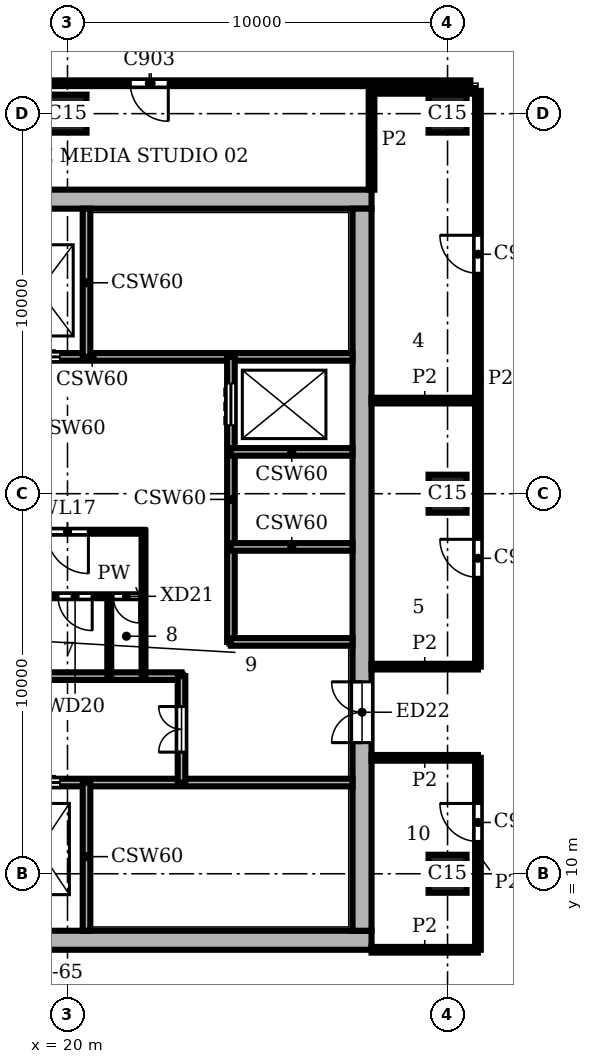
"""IFC4 building model, lengths in metres.
Left out: names, types, materials, properties, quantities, classifications, styles, units other than length and angle.
Written with IfcOpenShell. Run it as: python <this file> out.ifc"""

import sys

from ifc_helpers import new_model, si_unit, direction, frame, frame_2d, origin, origin_2d, place, context, subcontext, project, spatial, rectangle, extrude, element, fill, save


model = new_model("IFC4")
c1 = context("Model", 3, precision=1e-05, world=origin(), true_north=direction((0.0, 1.0)))
c2 = subcontext(c1, "Body", "Model", "MODEL_VIEW")
j1 = project(units=[si_unit("LENGTHUNIT", "METRE"), si_unit("PLANEANGLEUNIT", "RADIAN")], contexts=[c1])
p1 = place(None, origin())
s1 = spatial("IfcSite", under=j1, at=p1, CompositionType="ELEMENT")
p2 = place(p1, origin())
s2 = spatial("IfcBuilding", under=s1, at=p2, CompositionType="ELEMENT")
p3 = place(p2, frame((0.0, 0.0, 333.3)))
s3 = spatial("IfcBuildingStorey", under=s2, at=p3, CompositionType="ELEMENT", Elevation=333.3)
for number, where, z_axis, x_axis in (
    (1, (20.0, 30.0, 0.0), (0.0, 0.0, 1.0), (1.0, 0.0, 0.0)),
    (2, (30.0, 10.0, 0.0), (0.0, 0.0, 1.0), (1.0, 0.0, 0.0)),
    (3, (30.0, 20.0, 0.0), (0.0, 0.0, 1.0), (1.0, 0.0, 0.0)),
    (4, (30.0, 30.0, 0.0), (0.0, 0.0, 1.0), (1.0, 0.0, 0.0)),
):
    element("IfcColumn", number, at=place(p3, frame(where, z_axis=z_axis, x_axis=x_axis)), inside=s3, PredefinedType="COLUMN", context=c2, shape_type="SweptSolid", body=[
        extrude(rectangle(XDim=1.0, YDim=1.0, at=origin_2d()), origin(), (0.0, 0.0, 1.0), 3.9),
    ])
p4 = place(p3, frame((8.0, 8.25, 0.0), z_axis=(0.0, 0.0, 1.0), x_axis=(1.0, 0.0, 0.0)))
e5 = element("IfcWall", 5, at=p4, inside=s3, PredefinedType="SHEAR", context=c2, shape_type="SweptSolid", body=[
    extrude(rectangle(XDim=20.0, YDim=0.5, at=frame_2d((10.0, 0.0))), origin(), (0.0, 0.0, 1.0), 3.9),
])
p5 = place(p3, frame((27.75, 8.5, 0.0), z_axis=(0.0, 0.0, 1.0), x_axis=(0.0, 1.0, 0.0)))
e6 = element("IfcWall", 6, at=p5, inside=s3, PredefinedType="SHEAR", context=c2, shape_type="SweptSolid", body=[
    extrude(rectangle(XDim=19.0, YDim=0.5, at=frame_2d((9.5, 0.0))), origin(), (0.0, 0.0, 1.0), 3.9),
])
p6 = place(p5, frame((4.95, 0.0, 0.0)))
e7 = element("IfcOpeningElement", 7, at=p6, cuts=e6, PredefinedType="OPENING", context=c2, shape_type="SweptSolid", body=[
    extrude(rectangle(XDim=1.6, YDim=2.1, at=frame_2d((0.8, 1.05))), frame((0.0, 0.26, 0.0), z_axis=(0.0, -1.0, 0.0), x_axis=(1.0, 0.0, 0.0)), (0.0, 0.0, 1.0), 0.52),
])
p7 = place(p3, frame((28.0, 27.75, 0.0), z_axis=(0.0, 0.0, 1.0), x_axis=(-1.0, 0.0, 0.0)))
e8 = element("IfcWall", 8, at=p7, inside=s3, PredefinedType="SHEAR", context=c2, shape_type="SweptSolid", body=[
    extrude(rectangle(XDim=20.0, YDim=0.5, at=frame_2d((10.0, 0.0))), origin(), (0.0, 0.0, 1.0), 3.9),
])
p8 = place(p3, frame((13.8, 12.4, 0.0), z_axis=(0.0, 0.0, 1.0), x_axis=(1.0, 0.0, 0.0)))
e9 = element("IfcWall", 9, at=p8, inside=s3, PredefinedType="SHEAR", context=c2, shape_type="SweptSolid", body=[
    extrude(rectangle(XDim=13.7, YDim=0.2, at=frame_2d((6.85, 0.0))), origin(), (0.0, 0.0, 1.0), 3.58),
])
p9 = place(p8, frame((2.4, 0.0, 0.0)))
e10 = element("IfcOpeningElement", 10, at=p9, cuts=e9, PredefinedType="OPENING", context=c2, shape_type="SweptSolid", body=[
    extrude(rectangle(XDim=1.1, YDim=2.1, at=frame_2d((0.55, 1.05))), frame((0.0, 0.11, 0.0), z_axis=(0.0, -1.0, 0.0), x_axis=(1.0, 0.0, 0.0)), (0.0, 0.0, 1.0), 0.22),
])
p10 = place(p8, frame((4.9, 0.0, 0.0)))
e11 = element("IfcOpeningElement", 11, at=p10, cuts=e9, PredefinedType="OPENING", context=c2, shape_type="SweptSolid", body=[
    extrude(rectangle(XDim=1.1, YDim=2.1, at=frame_2d((0.55, 1.05))), frame((0.0, 0.11, 0.0), z_axis=(0.0, -1.0, 0.0), x_axis=(1.0, 0.0, 0.0)), (0.0, 0.0, 1.0), 0.22),
])
p11 = place(p8, frame((0.15, 0.0, 0.0)))
e12 = element("IfcOpeningElement", 12, at=p11, cuts=e9, PredefinedType="OPENING", context=c2, shape_type="SweptSolid", body=[
    extrude(rectangle(XDim=1.0, YDim=2.1, at=frame_2d((0.5, 1.05))), frame((0.0, 0.11, 0.0), z_axis=(0.0, -1.0, 0.0), x_axis=(1.0, 0.0, 0.0)), (0.0, 0.0, 1.0), 0.22),
])
p12 = place(p3, frame((13.3, 15.2, 0.0), z_axis=(0.0, 0.0, 1.0), x_axis=(1.0, 0.0, 0.0)))
e13 = element("IfcWall", 13, at=p12, inside=s3, PredefinedType="SHEAR", context=c2, shape_type="SweptSolid", body=[
    extrude(rectangle(XDim=9.7, YDim=0.2, at=frame_2d((4.85, 0.0))), origin(), (0.0, 0.0, 1.0), 3.58),
])
p13 = place(p3, frame((24.3, 16.1, 0.0), z_axis=(0.0, 0.0, 1.0), x_axis=(1.0, 0.0, 0.0)))
e14 = element("IfcWall", 14, at=p13, inside=s3, PredefinedType="SHEAR", context=c2, shape_type="SweptSolid", body=[
    extrude(rectangle(XDim=3.2, YDim=0.2, at=frame_2d((1.6, 0.0))), origin(), (0.0, 0.0, 1.0), 3.58),
])
p14 = place(p3, frame((14.0, 17.3, 0.0), z_axis=(0.0, 0.0, 1.0), x_axis=(1.0, 0.0, 0.0)))
e15 = element("IfcWall", 15, at=p14, inside=s3, PredefinedType="PARTITIONING", context=c2, shape_type="SweptSolid", body=[
    extrude(rectangle(XDim=8.0, YDim=0.1, at=frame_2d((4.0, 0.0))), origin(), (0.0, 0.0, 1.0), 3.58),
])
p15 = place(p14, frame((1.0, 0.0, 0.0)))
e16 = element("IfcOpeningElement", 16, at=p15, cuts=e15, PredefinedType="OPENING", context=c2, shape_type="SweptSolid", body=[
    extrude(rectangle(XDim=0.9, YDim=2.1, at=frame_2d((0.45, 1.05))), frame((0.0, 0.06, 0.0), z_axis=(0.0, -1.0, 0.0), x_axis=(1.0, 0.0, 0.0)), (0.0, 0.0, 1.0), 0.12),
])
p16 = place(p14, frame((3.65, 0.0, 0.0)))
e17 = element("IfcOpeningElement", 17, at=p16, cuts=e15, PredefinedType="OPENING", context=c2, shape_type="SweptSolid", body=[
    extrude(rectangle(XDim=0.9, YDim=2.1, at=frame_2d((0.45, 1.05))), frame((0.0, 0.06, 0.0), z_axis=(0.0, -1.0, 0.0), x_axis=(1.0, 0.0, 0.0)), (0.0, 0.0, 1.0), 0.12),
])
p17 = place(p14, frame((5.75, 0.0, 0.0)))
e18 = element("IfcOpeningElement", 18, at=p17, cuts=e15, PredefinedType="OPENING", context=c2, shape_type="SweptSolid", body=[
    extrude(rectangle(XDim=0.9, YDim=2.1, at=frame_2d((0.45, 1.05))), frame((0.0, 0.06, 0.0), z_axis=(0.0, -1.0, 0.0), x_axis=(1.0, 0.0, 0.0)), (0.0, 0.0, 1.0), 0.12),
])
p18 = place(p14, frame((7.2, 0.0, 0.0)))
e19 = element("IfcOpeningElement", 19, at=p18, cuts=e15, PredefinedType="OPENING", context=c2, shape_type="SweptSolid", body=[
    extrude(rectangle(XDim=0.7, YDim=2.1, at=frame_2d((0.35, 1.05))), frame((0.0, 0.06, 0.0), z_axis=(0.0, -1.0, 0.0), x_axis=(1.0, 0.0, 0.0)), (0.0, 0.0, 1.0), 0.12),
])
p19 = place(p3, frame((24.3, 18.6, 0.0), z_axis=(0.0, 0.0, 1.0), x_axis=(1.0, 0.0, 0.0)))
e20 = element("IfcWall", 20, at=p19, inside=s3, PredefinedType="SHEAR", context=c2, shape_type="SweptSolid", body=[
    extrude(rectangle(XDim=3.2, YDim=0.2, at=frame_2d((1.6, 0.0))), origin(), (0.0, 0.0, 1.0), 3.58),
])
p20 = place(p3, frame((14.0, 19.0, 0.0), z_axis=(0.0, 0.0, 1.0), x_axis=(1.0, 0.0, 0.0)))
e21 = element("IfcWall", 21, at=p20, inside=s3, PredefinedType="PARTITIONING", context=c2, shape_type="SweptSolid", body=[
    extrude(rectangle(XDim=8.0, YDim=0.1, at=frame_2d((4.0, 0.0))), origin(), (0.0, 0.0, 1.0), 3.58),
])
p21 = place(p20, frame((5.45, 0.0, 0.0)))
e22 = element("IfcOpeningElement", 22, at=p21, cuts=e21, PredefinedType="OPENING", context=c2, shape_type="SweptSolid", body=[
    extrude(rectangle(XDim=1.1, YDim=2.1, at=frame_2d((0.55, 1.05))), frame((0.0, 0.06, 0.0), z_axis=(0.0, -1.0, 0.0), x_axis=(1.0, 0.0, 0.0)), (0.0, 0.0, 1.0), 0.12),
])
p22 = place(p3, frame((24.3, 21.1, 0.0), z_axis=(0.0, 0.0, 1.0), x_axis=(1.0, 0.0, 0.0)))
e23 = element("IfcWall", 23, at=p22, inside=s3, PredefinedType="SHEAR", context=c2, shape_type="SweptSolid", body=[
    extrude(rectangle(XDim=3.2, YDim=0.2, at=frame_2d((1.6, 0.0))), origin(), (0.0, 0.0, 1.0), 3.58),
])
p23 = place(p3, frame((13.8, 23.6, 0.0), z_axis=(0.0, 0.0, 1.0), x_axis=(1.0, 0.0, 0.0)))
e24 = element("IfcWall", 24, at=p23, inside=s3, PredefinedType="SHEAR", context=c2, shape_type="SweptSolid", body=[
    extrude(rectangle(XDim=13.7, YDim=0.2, at=frame_2d((6.85, 0.0))), origin(), (0.0, 0.0, 1.0), 3.58),
])
p24 = place(p23, frame((2.4, 0.0, 0.0)))
e25 = element("IfcOpeningElement", 25, at=p24, cuts=e24, PredefinedType="OPENING", context=c2, shape_type="SweptSolid", body=[
    extrude(rectangle(XDim=1.1, YDim=2.1, at=frame_2d((0.55, 1.05))), frame((0.0, 0.11, 0.0), z_axis=(0.0, -1.0, 0.0), x_axis=(1.0, 0.0, 0.0)), (0.0, 0.0, 1.0), 0.22),
])
p25 = place(p23, frame((4.9, 0.0, 0.0)))
e26 = element("IfcOpeningElement", 26, at=p25, cuts=e24, PredefinedType="OPENING", context=c2, shape_type="SweptSolid", body=[
    extrude(rectangle(XDim=1.1, YDim=2.1, at=frame_2d((0.55, 1.05))), frame((0.0, 0.11, 0.0), z_axis=(0.0, -1.0, 0.0), x_axis=(1.0, 0.0, 0.0)), (0.0, 0.0, 1.0), 0.22),
])
p26 = place(p23, frame((0.15, 0.0, 0.0)))
e27 = element("IfcOpeningElement", 27, at=p26, cuts=e24, PredefinedType="OPENING", context=c2, shape_type="SweptSolid", body=[
    extrude(rectangle(XDim=1.0, YDim=2.1, at=frame_2d((0.5, 1.05))), frame((0.0, 0.11, 0.0), z_axis=(0.0, -1.0, 0.0), x_axis=(1.0, 0.0, 0.0)), (0.0, 0.0, 1.0), 0.22),
])
for number, where, z_axis, x_axis in (
    (28, (20.5, 8.5, 0.0), (0.0, 0.0, 1.0), (0.0, 1.0, 0.0)),
    (29, (20.5, 23.6, 0.0), (0.0, 0.0, 1.0), (0.0, 1.0, 0.0)),
):
    element("IfcWall", number, at=place(p3, frame(where, z_axis=z_axis, x_axis=x_axis)), inside=s3, PredefinedType="SHEAR", context=c2, shape_type="SweptSolid", body=[
        extrude(rectangle(XDim=3.9, YDim=0.2, at=frame_2d((1.95, 0.0))), origin(), (0.0, 0.0, 1.0), 3.58),
    ])
p27 = place(p3, frame((21.1, 15.2, 0.0), z_axis=(0.0, 0.0, 1.0), x_axis=(0.0, 1.0, 0.0)))
e30 = element("IfcWall", 30, at=p27, inside=s3, PredefinedType="PARTITIONING", context=c2, shape_type="SweptSolid", body=[
    extrude(rectangle(XDim=2.1, YDim=0.1, at=frame_2d((1.05, 0.0))), origin(), (0.0, 0.0, 1.0), 3.58),
])
p28 = place(p3, frame((22.0, 15.2, 0.0), z_axis=(0.0, 0.0, 1.0), x_axis=(0.0, 1.0, 0.0)))
e31 = element("IfcWall", 31, at=p28, inside=s3, PredefinedType="PARTITIONING", context=c2, shape_type="SweptSolid", body=[
    extrude(rectangle(XDim=3.8, YDim=0.1, at=frame_2d((1.9, 0.0))), origin(), (0.0, 0.0, 1.0), 3.58),
])
p29 = place(p3, frame((23.0, 12.4, 0.0), z_axis=(0.0, 0.0, 1.0), x_axis=(0.0, 1.0, 0.0)))
e32 = element("IfcWall", 32, at=p29, inside=s3, PredefinedType="SHEAR", context=c2, shape_type="SweptSolid", body=[
    extrude(rectangle(XDim=2.8, YDim=0.2, at=frame_2d((1.4, 0.0))), origin(), (0.0, 0.0, 1.0), 3.58),
])
p30 = place(p29, frame((0.8, 0.0, 0.0)))
e33 = element("IfcOpeningElement", 33, at=p30, cuts=e32, PredefinedType="OPENING", context=c2, shape_type="SweptSolid", body=[
    extrude(rectangle(XDim=1.2, YDim=2.1, at=frame_2d((0.6, 1.05))), frame((0.0, 0.11, 0.0), z_axis=(0.0, -1.0, 0.0), x_axis=(1.0, 0.0, 0.0)), (0.0, 0.0, 1.0), 0.22),
])
p31 = place(p3, frame((24.3, 16.1, 0.0), z_axis=(0.0, 0.0, 1.0), x_axis=(0.0, 1.0, 0.0)))
e34 = element("IfcWall", 34, at=p31, inside=s3, PredefinedType="SHEAR", context=c2, shape_type="SweptSolid", body=[
    extrude(rectangle(XDim=7.5, YDim=0.2, at=frame_2d((3.75, 0.0))), origin(), (0.0, 0.0, 1.0), 3.58),
])
p32 = place(p31, frame((5.7, 0.0, 0.0)))
e35 = element("IfcOpeningElement", 35, at=p32, cuts=e34, PredefinedType="OPENING", context=c2, shape_type="SweptSolid", body=[
    extrude(rectangle(XDim=1.1, YDim=2.1, at=frame_2d((0.55, 1.05))), frame((0.0, 0.11, 0.0), z_axis=(0.0, -1.0, 0.0), x_axis=(1.0, 0.0, 0.0)), (0.0, 0.0, 1.0), 0.22),
])
p33 = place(p3, frame((28.0, 28.0, 0.0), z_axis=(0.0, 0.0, 1.0), x_axis=(0.0, 1.0, 0.0)))
e36 = element("IfcWall", 36, at=p33, inside=s3, PredefinedType="PARTITIONING", context=c2, shape_type="SweptSolid", body=[
    extrude(rectangle(XDim=2.598, YDim=0.15, at=frame_2d((1.299, 0.0))), origin(), (0.0, 0.0, 1.0), 3.58),
])
p34 = place(p3, frame((30.8, 8.0, 0.0), z_axis=(0.0, 0.0, 1.0), x_axis=(0.0, 1.0, 0.0)))
e37 = element("IfcWall", 37, at=p34, inside=s3, PredefinedType="PARTITIONING", context=c2, shape_type="SweptSolid", body=[
    extrude(rectangle(XDim=5.05, YDim=0.15, at=frame_2d((2.525, 0.0))), origin(), (0.0, 0.0, 1.0), 3.58),
])
p35 = place(p34, frame((2.85, 0.0, 0.0)))
e38 = element("IfcOpeningElement", 38, at=p35, cuts=e37, PredefinedType="OPENING", context=c2, shape_type="SweptSolid", body=[
    extrude(rectangle(XDim=1.0, YDim=2.1, at=frame_2d((0.5, 1.05))), frame((0.0, 0.085, 0.0), z_axis=(0.0, -1.0, 0.0), x_axis=(1.0, 0.0, 0.0)), (0.0, 0.0, 1.0), 0.17),
])
p36 = place(p3, frame((30.8, 15.45, 0.0), z_axis=(0.0, 0.0, 1.0), x_axis=(0.0, 1.0, 0.0)))
e39 = element("IfcWall", 39, at=p36, inside=s3, PredefinedType="PARTITIONING", context=c2, shape_type="SweptSolid", body=[
    extrude(rectangle(XDim=15.15, YDim=0.15, at=frame_2d((7.575, 0.0))), origin(), (0.0, 0.0, 1.0), 3.58),
])
p37 = place(p36, frame((2.35, 0.0, 0.0)))
e40 = element("IfcOpeningElement", 40, at=p37, cuts=e39, PredefinedType="OPENING", context=c2, shape_type="SweptSolid", body=[
    extrude(rectangle(XDim=1.0, YDim=2.1, at=frame_2d((0.5, 1.05))), frame((0.0, 0.085, 0.0), z_axis=(0.0, -1.0, 0.0), x_axis=(1.0, 0.0, 0.0)), (0.0, 0.0, 1.0), 0.17),
])
p38 = place(p36, frame((10.35, 0.0, 0.0)))
e41 = element("IfcOpeningElement", 41, at=p38, cuts=e39, PredefinedType="OPENING", context=c2, shape_type="SweptSolid", body=[
    extrude(rectangle(XDim=1.0, YDim=2.1, at=frame_2d((0.5, 1.05))), frame((0.0, 0.085, 0.0), z_axis=(0.0, -1.0, 0.0), x_axis=(1.0, 0.0, 0.0)), (0.0, 0.0, 1.0), 0.17),
])
for number, where, z_axis, x_axis in (
    (42, (28.0, 8.0, 0.0), (0.0, 0.0, 1.0), (1.0, 0.0, 0.0)),
    (43, (28.0, 13.05, 0.0), (0.0, 0.0, 1.0), (1.0, 0.0, 0.0)),
    (44, (28.0, 15.45, 0.0), (0.0, 0.0, 1.0), (1.0, 0.0, 0.0)),
    (45, (28.0, 22.45, 0.0), (0.0, 0.0, 1.0), (1.0, 0.0, 0.0)),
):
    element("IfcWall", number, at=place(p3, frame(where, z_axis=z_axis, x_axis=x_axis)), inside=s3, PredefinedType="PARTITIONING", context=c2, shape_type="SweptSolid", body=[
        extrude(rectangle(XDim=2.8, YDim=0.15, at=frame_2d((1.4, 0.0))), origin(), (0.0, 0.0, 1.0), 3.58),
    ])
p39 = place(p3, frame((28.002, 30.6, 0.0), z_axis=(0.0, 0.0, 1.0), x_axis=(1.0, 0.0, 0.0)))
e46 = element("IfcWall", 46, at=p39, inside=s3, PredefinedType="PARTITIONING", context=c2, shape_type="SweptSolid", body=[
    extrude(rectangle(XDim=2.723, YDim=0.15, at=frame_2d((1.362, 0.0))), origin(), (0.0, 0.0, 1.0), 3.58),
])
p40 = place(p3, frame((13.802, 30.8, 0.0), z_axis=(0.0, 0.0, 1.0), x_axis=(1.0, 0.0, 0.0)))
e47 = element("IfcWall", 47, at=p40, inside=s3, PredefinedType="PARTITIONING", context=c2, shape_type="SweptSolid", body=[
    extrude(rectangle(XDim=16.798, YDim=0.15, at=frame_2d((8.399, 0.0))), origin(), (0.0, 0.0, 1.0), 3.58),
])
p41 = place(p40, frame((7.85, 0.0, 0.0)))
e48 = element("IfcOpeningElement", 48, at=p41, cuts=e47, PredefinedType="OPENING", context=c2, shape_type="SweptSolid", body=[
    extrude(rectangle(XDim=1.0, YDim=2.1, at=frame_2d((0.5, 1.05))), frame((0.0, 0.085, 0.0), z_axis=(0.0, -1.0, 0.0), x_axis=(1.0, 0.0, 0.0)), (0.0, 0.0, 1.0), 0.17),
])
p42 = place(p32, origin())
e49 = element("IfcDoor", 49, at=p42, inside=s3, OperationType="DOUBLE_DOOR_SLIDING", PredefinedType="DOOR", context=c2, shape_type="SweptSolid", body=[
    extrude(rectangle(XDim=1.1, YDim=2.1, at=frame_2d((0.55, 1.05))), frame((0.0, 0.025, 0.0), z_axis=(0.0, -1.0, 0.0), x_axis=(1.0, 0.0, 0.0)), (0.0, 0.0, 1.0), 0.05),
])
fill(e35, e49)
p43 = place(p10, origin())
e50 = element("IfcDoor", 50, at=p43, inside=s3, OperationType="DOUBLE_DOOR_SLIDING", PredefinedType="DOOR", context=c2, shape_type="SweptSolid", body=[
    extrude(rectangle(XDim=1.1, YDim=2.1, at=frame_2d((0.55, 1.05))), frame((0.0, 0.025, 0.0), z_axis=(0.0, -1.0, 0.0), x_axis=(1.0, 0.0, 0.0)), (0.0, 0.0, 1.0), 0.05),
])
fill(e11, e50)
p44 = place(p25, origin())
e51 = element("IfcDoor", 51, at=p44, inside=s3, OperationType="DOUBLE_DOOR_SLIDING", PredefinedType="DOOR", context=c2, shape_type="SweptSolid", body=[
    extrude(rectangle(XDim=1.1, YDim=2.1, at=frame_2d((0.55, 1.05))), frame((0.0, 0.025, 0.0), z_axis=(0.0, -1.0, 0.0), x_axis=(1.0, 0.0, 0.0)), (0.0, 0.0, 1.0), 0.05),
])
fill(e26, e51)
p45 = place(p30, origin())
e52 = element("IfcDoor", 52, at=p45, inside=s3, OperationType="DOUBLE_DOOR_SINGLE_SWING", PredefinedType="DOOR", context=c2, shape_type="SweptSolid", body=[
    extrude(rectangle(XDim=1.2, YDim=2.1, at=frame_2d((0.6, 1.05))), frame((0.0, 0.025, 0.0), z_axis=(0.0, -1.0, 0.0), x_axis=(1.0, 0.0, 0.0)), (0.0, 0.0, 1.0), 0.05),
])
fill(e33, e52)
p46 = place(p21, frame((1.1, 0.0, 0.0), z_axis=(0.0, 0.0, 1.0), x_axis=(-1.0, 0.0, 0.0)))
e53 = element("IfcDoor", 53, at=p46, inside=s3, OperationType="SINGLE_SWING_LEFT", PredefinedType="DOOR", context=c2, shape_type="SweptSolid", body=[
    extrude(rectangle(XDim=1.1, YDim=2.1, at=frame_2d((0.55, 1.05))), frame((0.0, 0.025, 0.0), z_axis=(0.0, -1.0, 0.0), x_axis=(1.0, 0.0, 0.0)), (0.0, 0.0, 1.0), 0.05),
])
fill(e22, e53)
p47 = place(p17, frame((0.9, 0.0, 0.0), z_axis=(0.0, 0.0, 1.0), x_axis=(-1.0, 0.0, 0.0)))
e54 = element("IfcDoor", 54, at=p47, inside=s3, OperationType="SINGLE_SWING_LEFT", PredefinedType="DOOR", context=c2, shape_type="SweptSolid", body=[
    extrude(rectangle(XDim=0.9, YDim=2.1, at=frame_2d((0.45, 1.05))), frame((0.0, 0.025, 0.0), z_axis=(0.0, -1.0, 0.0), x_axis=(1.0, 0.0, 0.0)), (0.0, 0.0, 1.0), 0.05),
])
fill(e18, e54)
p48 = place(p18, frame((0.7, 0.0, 0.0), z_axis=(0.0, 0.0, 1.0), x_axis=(-1.0, 0.0, 0.0)))
e55 = element("IfcDoor", 55, at=p48, inside=s3, OperationType="SINGLE_SWING_LEFT", PredefinedType="DOOR", context=c2, shape_type="SweptSolid", body=[
    extrude(rectangle(XDim=0.7, YDim=2.1, at=frame_2d((0.35, 1.05))), frame((0.0, 0.025, 0.0), z_axis=(0.0, -1.0, 0.0), x_axis=(1.0, 0.0, 0.0)), (0.0, 0.0, 1.0), 0.05),
])
fill(e19, e55)
p49 = place(p6, origin())
e56 = element("IfcDoor", 56, at=p49, inside=s3, OperationType="DOUBLE_DOOR_SINGLE_SWING", PredefinedType="DOOR", context=c2, shape_type="SweptSolid", body=[
    extrude(rectangle(XDim=1.6, YDim=2.1, at=frame_2d((0.8, 1.05))), frame((0.0, 0.025, 0.0), z_axis=(0.0, -1.0, 0.0), x_axis=(1.0, 0.0, 0.0)), (0.0, 0.0, 1.0), 0.05),
])
fill(e7, e56)
p50 = place(p37, origin())
e57 = element("IfcDoor", 57, at=p50, inside=s3, OperationType="SINGLE_SWING_RIGHT", PredefinedType="DOOR", context=c2, shape_type="SweptSolid", body=[
    extrude(rectangle(XDim=1.0, YDim=2.1, at=frame_2d((0.5, 1.05))), frame((0.0, 0.025, 0.0), z_axis=(0.0, -1.0, 0.0), x_axis=(1.0, 0.0, 0.0)), (0.0, 0.0, 1.0), 0.05),
])
fill(e40, e57)
p51 = place(p41, frame((1.0, 0.0, 0.0), z_axis=(0.0, 0.0, 1.0), x_axis=(-1.0, 0.0, 0.0)))
e58 = element("IfcDoor", 58, at=p51, inside=s3, OperationType="SINGLE_SWING_LEFT", PredefinedType="DOOR", context=c2, shape_type="SweptSolid", body=[
    extrude(rectangle(XDim=1.0, YDim=2.1, at=frame_2d((0.5, 1.05))), frame((0.0, 0.025, 0.0), z_axis=(0.0, -1.0, 0.0), x_axis=(1.0, 0.0, 0.0)), (0.0, 0.0, 1.0), 0.05),
])
fill(e48, e58)
p52 = place(p38, origin())
e59 = element("IfcDoor", 59, at=p52, inside=s3, OperationType="SINGLE_SWING_RIGHT", PredefinedType="DOOR", context=c2, shape_type="SweptSolid", body=[
    extrude(rectangle(XDim=1.0, YDim=2.1, at=frame_2d((0.5, 1.05))), frame((0.0, 0.025, 0.0), z_axis=(0.0, -1.0, 0.0), x_axis=(1.0, 0.0, 0.0)), (0.0, 0.0, 1.0), 0.05),
])
fill(e41, e59)
p53 = place(p35, origin())
e60 = element("IfcDoor", 60, at=p53, inside=s3, OperationType="SINGLE_SWING_RIGHT", PredefinedType="DOOR", context=c2, shape_type="SweptSolid", body=[
    extrude(rectangle(XDim=1.0, YDim=2.1, at=frame_2d((0.5, 1.05))), frame((0.0, 0.025, 0.0), z_axis=(0.0, -1.0, 0.0), x_axis=(1.0, 0.0, 0.0)), (0.0, 0.0, 1.0), 0.05),
])
fill(e38, e60)
save(model, sys.argv[1])
